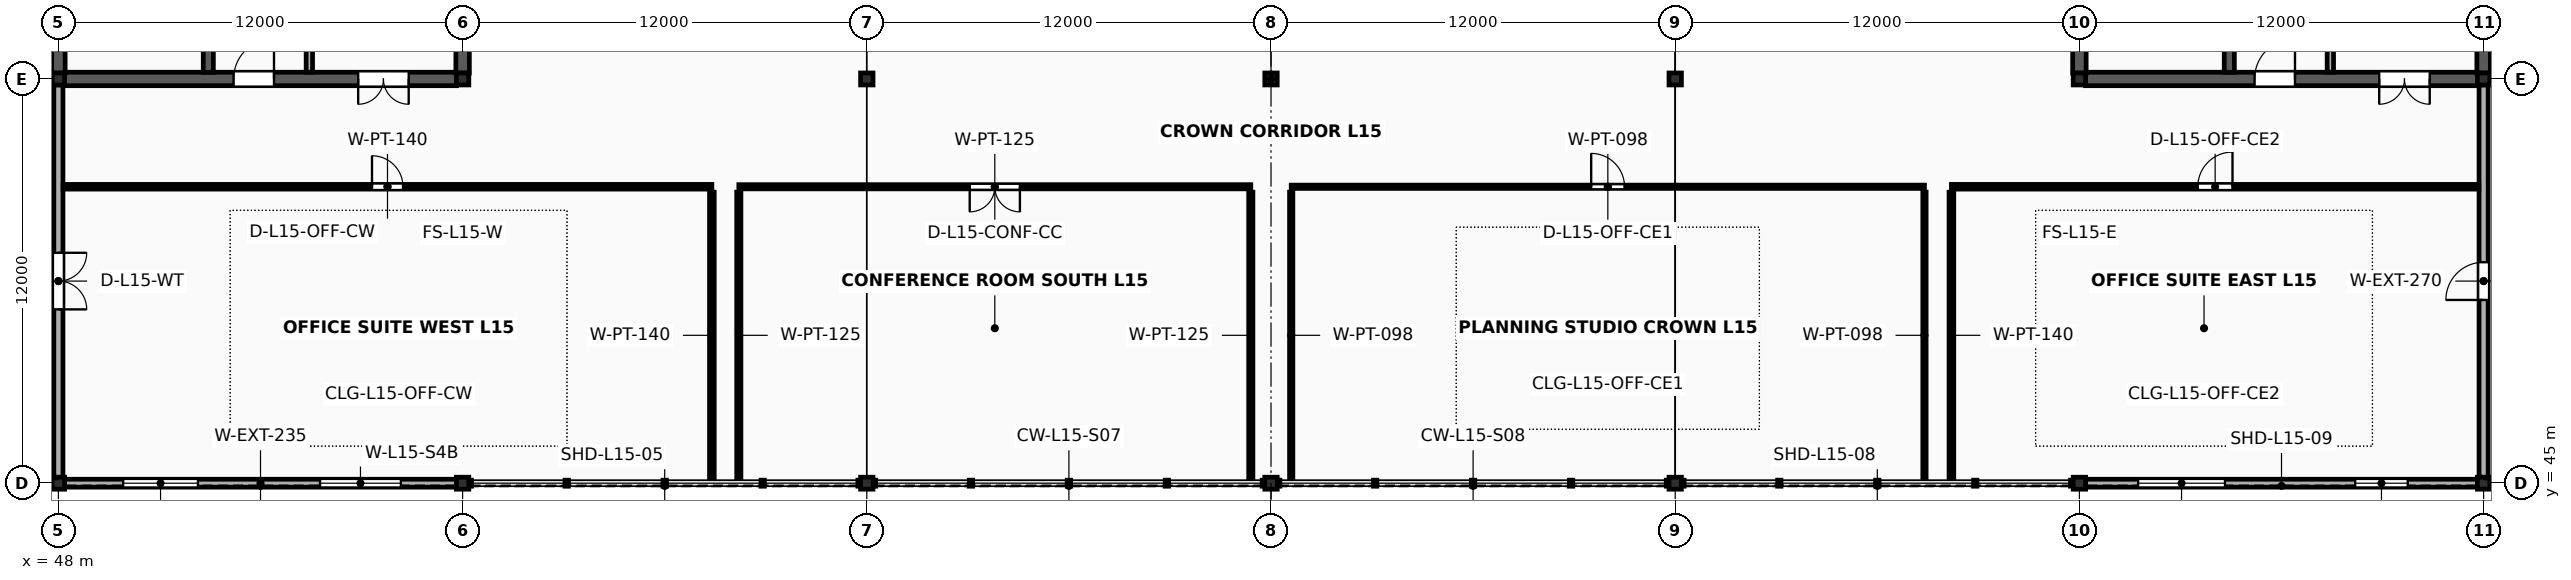
"""IFC4 building model, lengths in metres.
Left out: names, types, materials, properties, quantities, classifications, styles, units other than length and angle.
Written with IfcOpenShell. Run it as: python <this file> out.ifc"""

import sys

from ifc_helpers import new_model, si_unit, direction, frame, frame_2d, origin, origin_2d, place, context, subcontext, project, spatial, rectangle, i_section, extrude, element, fill, save


model = new_model("IFC4")
c1 = context("Model", 3, precision=1e-05, world=origin(), true_north=direction((0.0, 1.0)))
c2 = subcontext(c1, "Body", "Model", "MODEL_VIEW")
j1 = project(units=[si_unit("LENGTHUNIT", "METRE"), si_unit("PLANEANGLEUNIT", "RADIAN")], contexts=[c1])
p1 = place(None, origin())
s1 = spatial("IfcSite", under=j1, at=p1, CompositionType="ELEMENT")
p2 = place(p1, origin())
s2 = spatial("IfcBuilding", under=s1, at=p2, CompositionType="ELEMENT")
p3 = place(p2, frame((0.0, 0.0, 61.6)))
s3 = spatial("IfcBuildingStorey", under=s2, at=p3, CompositionType="ELEMENT", Elevation=61.6)
for number, where, z_axis, x_axis in (
    (1, (48.0, 45.0, 0.0), (0.0, 0.0, 1.0), (1.0, 0.0, 0.0)),
    (2, (48.0, 57.0, 0.0), (0.0, 0.0, 1.0), (1.0, 0.0, 0.0)),
    (3, (60.0, 45.0, 0.0), (0.0, 0.0, 1.0), (1.0, 0.0, 0.0)),
    (4, (60.0, 57.0, 0.0), (0.0, 0.0, 1.0), (1.0, 0.0, 0.0)),
    (5, (72.0, 45.0, 0.0), (0.0, 0.0, 1.0), (1.0, 0.0, 0.0)),
    (6, (72.0, 57.0, 0.0), (0.0, 0.0, 1.0), (1.0, 0.0, 0.0)),
    (7, (84.0, 45.0, 0.0), (0.0, 0.0, 1.0), (1.0, 0.0, 0.0)),
    (8, (84.0, 57.0, 0.0), (0.0, 0.0, 1.0), (1.0, 0.0, 0.0)),
    (9, (96.0, 45.0, 0.0), (0.0, 0.0, 1.0), (1.0, 0.0, 0.0)),
    (10, (96.0, 57.0, 0.0), (0.0, 0.0, 1.0), (1.0, 0.0, 0.0)),
    (11, (108.0, 45.0, 0.0), (0.0, 0.0, 1.0), (1.0, 0.0, 0.0)),
    (12, (108.0, 57.0, 0.0), (0.0, 0.0, 1.0), (1.0, 0.0, 0.0)),
    (13, (120.0, 45.0, 0.0), (0.0, 0.0, 1.0), (1.0, 0.0, 0.0)),
    (14, (120.0, 57.0, 0.0), (0.0, 0.0, 1.0), (1.0, 0.0, 0.0)),
):
    element("IfcColumn", number, at=place(p3, frame(where, z_axis=z_axis, x_axis=x_axis)), inside=s3, PredefinedType="COLUMN", context=c2, shape_type="SweptSolid", body=[
        extrude(i_section(OverallWidth=0.369, OverallDepth=0.356, WebThickness=0.011, FlangeThickness=0.018, FilletRadius=0.018, at=origin_2d()), origin(), (0.0, 0.0, 1.0), 4.0),
    ])
p4 = place(p3, frame((48.181, 57.0, 0.0), z_axis=(0.0, 0.0, 1.0), x_axis=(1.0, 0.0, 0.0)))
e15 = element("IfcWall", 15, at=p4, inside=s3, PredefinedType="SHEAR", context=c2, shape_type="SweptSolid", body=[
    extrude(rectangle(XDim=11.637, YDim=0.4, at=frame_2d((5.819, 0.0))), origin(), (0.0, 0.0, 1.0), 3.843),
])
p5 = place(p4, frame((5.019, 0.0, 0.0)))
e16 = element("IfcOpeningElement", 16, at=p5, cuts=e15, PredefinedType="OPENING", context=c2, shape_type="SweptSolid", body=[
    extrude(rectangle(XDim=1.2, YDim=2.2, at=frame_2d((0.6, 1.1))), frame((0.0, 0.215, 0.0), z_axis=(0.0, -1.0, 0.0), x_axis=(1.0, 0.0, 0.0)), (0.0, 0.0, 1.0), 0.43),
])
p6 = place(p4, frame((8.718, 0.0, 0.0)))
e17 = element("IfcOpeningElement", 17, at=p6, cuts=e15, PredefinedType="OPENING", context=c2, shape_type="SweptSolid", body=[
    extrude(rectangle(XDim=1.5, YDim=2.25, at=frame_2d((0.75, 1.125))), frame((0.0, 0.215, 0.0), z_axis=(0.0, -1.0, 0.0), x_axis=(1.0, 0.0, 0.0)), (0.0, 0.0, 1.0), 0.43),
])
for number, where, z_axis, x_axis in (
    (18, (48.0, 57.175, 0.0), (0.0, 0.0, 1.0), (0.0, 1.0, 0.0)),
    (19, (60.0, 57.175, 0.0), (0.0, 0.0, 1.0), (0.0, 1.0, 0.0)),
):
    element("IfcWall", number, at=place(p3, frame(where, z_axis=z_axis, x_axis=x_axis)), inside=s3, PredefinedType="SHEAR", context=c2, shape_type="SweptSolid", body=[
        extrude(rectangle(XDim=11.65, YDim=0.4, at=frame_2d((5.825, 0.0))), origin(), (0.0, 0.0, 1.0), 3.843),
    ])
p7 = place(p3, frame((52.45, 57.197, 0.0), z_axis=(0.0, 0.0, 1.0), x_axis=(0.0, 1.0, 0.0)))
e20 = element("IfcWall", 20, at=p7, inside=s3, PredefinedType="SHEAR", context=c2, shape_type="SweptSolid", body=[
    extrude(rectangle(XDim=11.606, YDim=0.3, at=frame_2d((5.803, 0.0))), origin(), (0.0, 0.0, 1.0), 3.843),
])
p8 = place(p7, frame((0.9, 0.0, 0.0)))
e21 = element("IfcOpeningElement", 21, at=p8, cuts=e20, PredefinedType="OPENING", context=c2, shape_type="SweptSolid", body=[
    extrude(rectangle(XDim=1.1, YDim=2.2, at=frame_2d((0.55, 1.1))), frame((0.0, 0.165, 0.0), z_axis=(0.0, -1.0, 0.0), x_axis=(1.0, 0.0, 0.0)), (0.0, 0.0, 1.0), 0.33),
])
p9 = place(p3, frame((55.45, 57.2, 0.0), z_axis=(0.0, 0.0, 1.0), x_axis=(0.0, 1.0, 0.0)))
e22 = element("IfcWall", 22, at=p9, inside=s3, PredefinedType="SOLIDWALL", context=c2, shape_type="SweptSolid", body=[
    extrude(rectangle(XDim=8.48, YDim=0.19, at=frame_2d((4.24, 0.0))), origin(), (0.0, 0.0, 1.0), 3.833),
])
p10 = place(p9, frame((3.6, 0.0, 0.0)))
e23 = element("IfcOpeningElement", 23, at=p10, cuts=e22, PredefinedType="OPENING", context=c2, shape_type="SweptSolid", body=[
    extrude(rectangle(XDim=1.04, YDim=2.18, at=frame_2d((0.52, 1.09))), frame((0.0, 0.11, 0.0), z_axis=(0.0, -1.0, 0.0), x_axis=(1.0, 0.0, 0.0)), (0.0, 0.0, 1.0), 0.22),
])
p11 = place(p3, frame((108.181, 57.0, 0.0), z_axis=(0.0, 0.0, 1.0), x_axis=(1.0, 0.0, 0.0)))
e24 = element("IfcWall", 24, at=p11, inside=s3, PredefinedType="SHEAR", context=c2, shape_type="SweptSolid", body=[
    extrude(rectangle(XDim=11.637, YDim=0.4, at=frame_2d((5.819, 0.0))), origin(), (0.0, 0.0, 1.0), 3.843),
])
p12 = place(p11, frame((5.019, 0.0, 0.0)))
e25 = element("IfcOpeningElement", 25, at=p12, cuts=e24, PredefinedType="OPENING", context=c2, shape_type="SweptSolid", body=[
    extrude(rectangle(XDim=1.2, YDim=2.2, at=frame_2d((0.6, 1.1))), frame((0.0, 0.215, 0.0), z_axis=(0.0, -1.0, 0.0), x_axis=(1.0, 0.0, 0.0)), (0.0, 0.0, 1.0), 0.43),
])
p13 = place(p11, frame((8.719, 0.0, 0.0)))
e26 = element("IfcOpeningElement", 26, at=p13, cuts=e24, PredefinedType="OPENING", context=c2, shape_type="SweptSolid", body=[
    extrude(rectangle(XDim=1.5, YDim=2.25, at=frame_2d((0.75, 1.125))), frame((0.0, 0.215, 0.0), z_axis=(0.0, -1.0, 0.0), x_axis=(1.0, 0.0, 0.0)), (0.0, 0.0, 1.0), 0.43),
])
for number, where, z_axis, x_axis in (
    (27, (108.0, 57.175, 0.0), (0.0, 0.0, 1.0), (0.0, 1.0, 0.0)),
    (28, (120.0, 57.175, 0.0), (0.0, 0.0, 1.0), (0.0, 1.0, 0.0)),
):
    element("IfcWall", number, at=place(p3, frame(where, z_axis=z_axis, x_axis=x_axis)), inside=s3, PredefinedType="SHEAR", context=c2, shape_type="SweptSolid", body=[
        extrude(rectangle(XDim=11.65, YDim=0.4, at=frame_2d((5.825, 0.0))), origin(), (0.0, 0.0, 1.0), 3.843),
    ])
p14 = place(p3, frame((112.45, 57.197, 0.0), z_axis=(0.0, 0.0, 1.0), x_axis=(0.0, 1.0, 0.0)))
e29 = element("IfcWall", 29, at=p14, inside=s3, PredefinedType="SHEAR", context=c2, shape_type="SweptSolid", body=[
    extrude(rectangle(XDim=11.606, YDim=0.3, at=frame_2d((5.803, 0.0))), origin(), (0.0, 0.0, 1.0), 3.843),
])
p15 = place(p14, frame((0.9, 0.0, 0.0)))
e30 = element("IfcOpeningElement", 30, at=p15, cuts=e29, PredefinedType="OPENING", context=c2, shape_type="SweptSolid", body=[
    extrude(rectangle(XDim=1.1, YDim=2.2, at=frame_2d((0.55, 1.1))), frame((0.0, 0.165, 0.0), z_axis=(0.0, -1.0, 0.0), x_axis=(1.0, 0.0, 0.0)), (0.0, 0.0, 1.0), 0.33),
])
p16 = place(p3, frame((115.45, 57.2, 0.0), z_axis=(0.0, 0.0, 1.0), x_axis=(0.0, 1.0, 0.0)))
e31 = element("IfcWall", 31, at=p16, inside=s3, PredefinedType="SOLIDWALL", context=c2, shape_type="SweptSolid", body=[
    extrude(rectangle(XDim=8.48, YDim=0.19, at=frame_2d((4.24, 0.0))), origin(), (0.0, 0.0, 1.0), 3.833),
])
p17 = place(p16, frame((3.6, 0.0, 0.0)))
e32 = element("IfcOpeningElement", 32, at=p17, cuts=e31, PredefinedType="OPENING", context=c2, shape_type="SweptSolid", body=[
    extrude(rectangle(XDim=1.04, YDim=2.18, at=frame_2d((0.52, 1.09))), frame((0.0, 0.11, 0.0), z_axis=(0.0, -1.0, 0.0), x_axis=(1.0, 0.0, 0.0)), (0.0, 0.0, 1.0), 0.22),
])
p18 = place(p3, frame((48.183, 45.0, 0.0), z_axis=(0.0, 0.0, 1.0), x_axis=(1.0, 0.0, 0.0)))
e33 = element("IfcWall", 33, at=p18, inside=s3, PredefinedType="SOLIDWALL", context=c2, shape_type="SweptSolid", body=[
    extrude(rectangle(XDim=11.635, YDim=0.235, at=frame_2d((5.817, 0.0))), origin(), (0.0, 0.0, 1.0), 3.296),
])
p19 = place(p18, frame((1.74, 0.0, 0.78)))
e34 = element("IfcOpeningElement", 34, at=p19, cuts=e33, PredefinedType="OPENING", context=c2, shape_type="SweptSolid", body=[
    extrude(rectangle(XDim=2.22, YDim=1.74, at=frame_2d((1.11, 0.87))), frame((0.0, 0.133, 0.0), z_axis=(0.0, -1.0, 0.0), x_axis=(1.0, 0.0, 0.0)), (0.0, 0.0, 1.0), 0.265),
])
p20 = place(p18, frame((7.585, 0.0, 0.78)))
e35 = element("IfcOpeningElement", 35, at=p20, cuts=e33, PredefinedType="OPENING", context=c2, shape_type="SweptSolid", body=[
    extrude(rectangle(XDim=2.4, YDim=1.74, at=frame_2d((1.2, 0.87))), frame((0.0, 0.133, 0.0), z_axis=(0.0, -1.0, 0.0), x_axis=(1.0, 0.0, 0.0)), (0.0, 0.0, 1.0), 0.265),
])
p21 = place(p3, frame((108.183, 45.0, 0.0), z_axis=(0.0, 0.0, 1.0), x_axis=(1.0, 0.0, 0.0)))
e36 = element("IfcWall", 36, at=p21, inside=s3, PredefinedType="SOLIDWALL", context=c2, shape_type="SweptSolid", body=[
    extrude(rectangle(XDim=11.635, YDim=0.235, at=frame_2d((5.817, 0.0))), origin(), (0.0, 0.0, 1.0), 3.296),
])
p22 = place(p21, frame((1.56, 0.0, 0.78)))
e37 = element("IfcOpeningElement", 37, at=p22, cuts=e36, PredefinedType="OPENING", context=c2, shape_type="SweptSolid", body=[
    extrude(rectangle(XDim=2.58, YDim=1.74, at=frame_2d((1.29, 0.87))), frame((0.0, 0.133, 0.0), z_axis=(0.0, -1.0, 0.0), x_axis=(1.0, 0.0, 0.0)), (0.0, 0.0, 1.0), 0.265),
])
p23 = place(p21, frame((8.005, 0.0, 0.78)))
e38 = element("IfcOpeningElement", 38, at=p23, cuts=e36, PredefinedType="OPENING", context=c2, shape_type="SweptSolid", body=[
    extrude(rectangle(XDim=1.56, YDim=1.9, at=frame_2d((0.78, 0.95))), frame((0.0, 0.133, 0.0), z_axis=(0.0, -1.0, 0.0), x_axis=(1.0, 0.0, 0.0)), (0.0, 0.0, 1.0), 0.265),
])
p24 = place(p3, frame((48.0, 45.176, 0.0), z_axis=(0.0, 0.0, 1.0), x_axis=(0.0, 1.0, 0.0)))
e39 = element("IfcWall", 39, at=p24, inside=s3, PredefinedType="SOLIDWALL", context=c2, shape_type="SweptSolid", body=[
    extrude(rectangle(XDim=11.648, YDim=0.27, at=frame_2d((5.824, 0.0))), origin(), (0.0, 0.0, 1.0), 3.296),
])
p25 = place(p24, frame((4.984, 0.0, 0.0)))
e40 = element("IfcOpeningElement", 40, at=p25, cuts=e39, PredefinedType="OPENING", context=c2, shape_type="SweptSolid", body=[
    extrude(rectangle(XDim=1.68, YDim=2.34, at=frame_2d((0.84, 1.17))), frame((0.0, 0.15, 0.0), z_axis=(0.0, -1.0, 0.0), x_axis=(1.0, 0.0, 0.0)), (0.0, 0.0, 1.0), 0.3),
])
p26 = place(p3, frame((120.0, 45.176, 0.0), z_axis=(0.0, 0.0, 1.0), x_axis=(0.0, 1.0, 0.0)))
e41 = element("IfcWall", 41, at=p26, inside=s3, PredefinedType="SOLIDWALL", context=c2, shape_type="SweptSolid", body=[
    extrude(rectangle(XDim=11.648, YDim=0.27, at=frame_2d((5.824, 0.0))), origin(), (0.0, 0.0, 1.0), 3.296),
])
p27 = place(p26, frame((5.264, 0.0, 0.0)))
e42 = element("IfcOpeningElement", 42, at=p27, cuts=e41, PredefinedType="OPENING", context=c2, shape_type="SweptSolid", body=[
    extrude(rectangle(XDim=1.12, YDim=2.18, at=frame_2d((0.56, 1.09))), frame((0.0, 0.15, 0.0), z_axis=(0.0, -1.0, 0.0), x_axis=(1.0, 0.0, 0.0)), (0.0, 0.0, 1.0), 0.3),
])
p28 = place(p3, frame((48.14, 53.8, 0.0), z_axis=(0.0, 0.0, 1.0), x_axis=(1.0, 0.0, 0.0)))
e43 = element("IfcWall", 43, at=p28, inside=s3, PredefinedType="PARTITIONING", context=c2, shape_type="SweptSolid", body=[
    extrude(rectangle(XDim=19.26, YDim=0.14, at=frame_2d((9.63, 0.0))), origin(), (0.0, 0.0, 1.0), 2.88),
])
p29 = place(p28, frame((9.17, 0.0, 0.0)))
e44 = element("IfcOpeningElement", 44, at=p29, cuts=e43, PredefinedType="OPENING", context=c2, shape_type="SweptSolid", body=[
    extrude(rectangle(XDim=0.92, YDim=2.1, at=frame_2d((0.46, 1.05))), frame((0.0, 0.085, 0.0), z_axis=(0.0, -1.0, 0.0), x_axis=(1.0, 0.0, 0.0)), (0.0, 0.0, 1.0), 0.17),
])
p30 = place(p3, frame((67.4, 45.14, 0.0), z_axis=(0.0, 0.0, 1.0), x_axis=(0.0, 1.0, 0.0)))
e45 = element("IfcWall", 45, at=p30, inside=s3, PredefinedType="PARTITIONING", context=c2, shape_type="SweptSolid", body=[
    extrude(rectangle(XDim=8.5, YDim=0.14, at=frame_2d((4.25, 0.0))), origin(), (0.0, 0.0, 1.0), 2.88),
])
p31 = place(p3, frame((68.2, 53.8, 0.0), z_axis=(0.0, 0.0, 1.0), x_axis=(1.0, 0.0, 0.0)))
e46 = element("IfcWall", 46, at=p31, inside=s3, PredefinedType="PARTITIONING", context=c2, shape_type="SweptSolid", body=[
    extrude(rectangle(XDim=15.2, YDim=0.125, at=frame_2d((7.6, 0.0))), origin(), (0.0, 0.0, 1.0), 2.88),
])
p32 = place(p31, frame((6.855, 0.0, 0.0)))
e47 = element("IfcOpeningElement", 47, at=p32, cuts=e46, PredefinedType="OPENING", context=c2, shape_type="SweptSolid", body=[
    extrude(rectangle(XDim=1.49, YDim=2.28, at=frame_2d((0.745, 1.14))), frame((0.0, 0.077, 0.0), z_axis=(0.0, -1.0, 0.0), x_axis=(1.0, 0.0, 0.0)), (0.0, 0.0, 1.0), 0.155),
])
for number, where, z_axis, x_axis in (
    (48, (68.2, 45.14, 0.0), (0.0, 0.0, 1.0), (0.0, 1.0, 0.0)),
    (49, (83.4, 45.14, 0.0), (0.0, 0.0, 1.0), (0.0, 1.0, 0.0)),
):
    element("IfcWall", number, at=place(p3, frame(where, z_axis=z_axis, x_axis=x_axis)), inside=s3, PredefinedType="PARTITIONING", context=c2, shape_type="SweptSolid", body=[
        extrude(rectangle(XDim=8.5, YDim=0.125, at=frame_2d((4.25, 0.0))), origin(), (0.0, 0.0, 1.0), 2.88),
    ])
p33 = place(p3, frame((84.6, 53.8, 0.0), z_axis=(0.0, 0.0, 1.0), x_axis=(1.0, 0.0, 0.0)))
e50 = element("IfcWall", 50, at=p33, inside=s3, PredefinedType="PARTITIONING", context=c2, shape_type="SweptSolid", body=[
    extrude(rectangle(XDim=18.8, YDim=0.098, at=frame_2d((9.4, 0.0))), origin(), (0.0, 0.0, 1.0), 2.88),
])
p34 = place(p33, frame((8.905, 0.0, 0.0)))
e51 = element("IfcOpeningElement", 51, at=p34, cuts=e50, PredefinedType="OPENING", context=c2, shape_type="SweptSolid", body=[
    extrude(rectangle(XDim=0.99, YDim=2.15, at=frame_2d((0.495, 1.075))), frame((0.0, 0.064, 0.0), z_axis=(0.0, -1.0, 0.0), x_axis=(1.0, 0.0, 0.0)), (0.0, 0.0, 1.0), 0.128),
])
for number, where, z_axis, x_axis in (
    (52, (84.6, 45.14, 0.0), (0.0, 0.0, 1.0), (0.0, 1.0, 0.0)),
    (53, (103.4, 45.14, 0.0), (0.0, 0.0, 1.0), (0.0, 1.0, 0.0)),
):
    element("IfcWall", number, at=place(p3, frame(where, z_axis=z_axis, x_axis=x_axis)), inside=s3, PredefinedType="PARTITIONING", context=c2, shape_type="SweptSolid", body=[
        extrude(rectangle(XDim=8.5, YDim=0.098, at=frame_2d((4.25, 0.0))), origin(), (0.0, 0.0, 1.0), 2.88),
    ])
p35 = place(p3, frame((104.2, 53.8, 0.0), z_axis=(0.0, 0.0, 1.0), x_axis=(1.0, 0.0, 0.0)))
e54 = element("IfcWall", 54, at=p35, inside=s3, PredefinedType="PARTITIONING", context=c2, shape_type="SweptSolid", body=[
    extrude(rectangle(XDim=15.66, YDim=0.14, at=frame_2d((7.83, 0.0))), origin(), (0.0, 0.0, 1.0), 2.88),
])
p36 = place(p35, frame((7.315, 0.0, 0.0)))
e55 = element("IfcOpeningElement", 55, at=p36, cuts=e54, PredefinedType="OPENING", context=c2, shape_type="SweptSolid", body=[
    extrude(rectangle(XDim=1.03, YDim=2.17, at=frame_2d((0.515, 1.085))), frame((0.0, 0.085, 0.0), z_axis=(0.0, -1.0, 0.0), x_axis=(1.0, 0.0, 0.0)), (0.0, 0.0, 1.0), 0.17),
])
p37 = place(p3, frame((104.2, 45.14, 0.0), z_axis=(0.0, 0.0, 1.0), x_axis=(0.0, 1.0, 0.0)))
e56 = element("IfcWall", 56, at=p37, inside=s3, PredefinedType="PARTITIONING", context=c2, shape_type="SweptSolid", body=[
    extrude(rectangle(XDim=8.5, YDim=0.14, at=frame_2d((4.25, 0.0))), origin(), (0.0, 0.0, 1.0), 2.88),
])
p38 = place(p19, origin())
e57 = element("IfcWindow", 57, at=p38, inside=s3, PartitioningType="DOUBLE_PANEL_VERTICAL", PredefinedType="WINDOW", context=c2, shape_type="SweptSolid", body=[
    extrude(rectangle(XDim=2.22, YDim=1.74, at=frame_2d((1.11, 0.87))), frame((0.0, 0.03, 0.0), z_axis=(0.0, -1.0, 0.0), x_axis=(1.0, 0.0, 0.0)), (0.0, 0.0, 1.0), 0.06),
])
fill(e34, e57)
p39 = place(p20, origin())
e58 = element("IfcWindow", 58, at=p39, inside=s3, PartitioningType="DOUBLE_PANEL_VERTICAL", PredefinedType="WINDOW", context=c2, shape_type="SweptSolid", body=[
    extrude(rectangle(XDim=2.4, YDim=1.74, at=frame_2d((1.2, 0.87))), frame((0.0, 0.03, 0.0), z_axis=(0.0, -1.0, 0.0), x_axis=(1.0, 0.0, 0.0)), (0.0, 0.0, 1.0), 0.06),
])
fill(e35, e58)
p40 = place(p22, origin())
e59 = element("IfcWindow", 59, at=p40, inside=s3, PartitioningType="DOUBLE_PANEL_VERTICAL", PredefinedType="WINDOW", context=c2, shape_type="SweptSolid", body=[
    extrude(rectangle(XDim=2.58, YDim=1.74, at=frame_2d((1.29, 0.87))), frame((0.0, 0.03, 0.0), z_axis=(0.0, -1.0, 0.0), x_axis=(1.0, 0.0, 0.0)), (0.0, 0.0, 1.0), 0.06),
])
fill(e37, e59)
p41 = place(p23, origin())
e60 = element("IfcWindow", 60, at=p41, inside=s3, PartitioningType="SINGLE_PANEL", PredefinedType="WINDOW", context=c2, shape_type="SweptSolid", body=[
    extrude(rectangle(XDim=1.56, YDim=1.9, at=frame_2d((0.78, 0.95))), frame((0.0, 0.03, 0.0), z_axis=(0.0, -1.0, 0.0), x_axis=(1.0, 0.0, 0.0)), (0.0, 0.0, 1.0), 0.06),
])
fill(e38, e60)
p42 = place(p25, origin())
e61 = element("IfcDoor", 61, at=p42, inside=s3, OperationType="DOUBLE_DOOR_SINGLE_SWING", PredefinedType="DOOR", context=c2, shape_type="SweptSolid", body=[
    extrude(rectangle(XDim=1.68, YDim=2.34, at=frame_2d((0.84, 1.17))), frame((0.0, 0.025, 0.0), z_axis=(0.0, -1.0, 0.0), x_axis=(1.0, 0.0, 0.0)), (0.0, 0.0, 1.0), 0.05),
])
fill(e40, e61)
p43 = place(p27, origin())
e62 = element("IfcDoor", 62, at=p43, inside=s3, OperationType="SINGLE_SWING_LEFT", PredefinedType="DOOR", context=c2, shape_type="SweptSolid", body=[
    extrude(rectangle(XDim=1.12, YDim=2.18, at=frame_2d((0.56, 1.09))), frame((0.0, 0.025, 0.0), z_axis=(0.0, -1.0, 0.0), x_axis=(1.0, 0.0, 0.0)), (0.0, 0.0, 1.0), 0.05),
])
fill(e42, e62)
p44 = place(p5, origin())
e63 = element("IfcDoor", 63, at=p44, inside=s3, OperationType="SINGLE_SWING_RIGHT", PredefinedType="DOOR", context=c2, shape_type="SweptSolid", body=[
    extrude(rectangle(XDim=1.2, YDim=2.2, at=frame_2d((0.6, 1.1))), frame((0.0, 0.025, 0.0), z_axis=(0.0, -1.0, 0.0), x_axis=(1.0, 0.0, 0.0)), (0.0, 0.0, 1.0), 0.05),
])
fill(e16, e63)
p45 = place(p6, origin())
e64 = element("IfcDoor", 64, at=p45, inside=s3, OperationType="DOUBLE_DOOR_SINGLE_SWING", PredefinedType="DOOR", context=c2, shape_type="SweptSolid", body=[
    extrude(rectangle(XDim=1.5, YDim=2.25, at=frame_2d((0.75, 1.125))), frame((0.0, 0.025, 0.0), z_axis=(0.0, -1.0, 0.0), x_axis=(1.0, 0.0, 0.0)), (0.0, 0.0, 1.0), 0.05),
])
fill(e17, e64)
p46 = place(p12, origin())
e65 = element("IfcDoor", 65, at=p46, inside=s3, OperationType="SINGLE_SWING_RIGHT", PredefinedType="DOOR", context=c2, shape_type="SweptSolid", body=[
    extrude(rectangle(XDim=1.2, YDim=2.2, at=frame_2d((0.6, 1.1))), frame((0.0, 0.025, 0.0), z_axis=(0.0, -1.0, 0.0), x_axis=(1.0, 0.0, 0.0)), (0.0, 0.0, 1.0), 0.05),
])
fill(e25, e65)
p47 = place(p13, origin())
e66 = element("IfcDoor", 66, at=p47, inside=s3, OperationType="DOUBLE_DOOR_SINGLE_SWING", PredefinedType="DOOR", context=c2, shape_type="SweptSolid", body=[
    extrude(rectangle(XDim=1.5, YDim=2.25, at=frame_2d((0.75, 1.125))), frame((0.0, 0.025, 0.0), z_axis=(0.0, -1.0, 0.0), x_axis=(1.0, 0.0, 0.0)), (0.0, 0.0, 1.0), 0.05),
])
fill(e26, e66)
p48 = place(p29, origin())
e67 = element("IfcDoor", 67, at=p48, inside=s3, OperationType="SINGLE_SWING_LEFT", PredefinedType="DOOR", context=c2, shape_type="SweptSolid", body=[
    extrude(rectangle(XDim=0.92, YDim=2.1, at=frame_2d((0.46, 1.05))), frame((0.0, 0.025, 0.0), z_axis=(0.0, -1.0, 0.0), x_axis=(1.0, 0.0, 0.0)), (0.0, 0.0, 1.0), 0.05),
])
fill(e44, e67)
p49 = place(p32, origin())
e68 = element("IfcDoor", 68, at=p49, inside=s3, OperationType="DOUBLE_DOOR_SINGLE_SWING", PredefinedType="DOOR", context=c2, shape_type="SweptSolid", body=[
    extrude(rectangle(XDim=1.49, YDim=2.28, at=frame_2d((0.745, 1.14))), frame((0.0, 0.025, 0.0), z_axis=(0.0, -1.0, 0.0), x_axis=(1.0, 0.0, 0.0)), (0.0, 0.0, 1.0), 0.05),
])
fill(e47, e68)
p50 = place(p34, origin())
e69 = element("IfcDoor", 69, at=p50, inside=s3, OperationType="SINGLE_SWING_LEFT", PredefinedType="DOOR", context=c2, shape_type="SweptSolid", body=[
    extrude(rectangle(XDim=0.99, YDim=2.15, at=frame_2d((0.495, 1.075))), frame((0.0, 0.025, 0.0), z_axis=(0.0, -1.0, 0.0), x_axis=(1.0, 0.0, 0.0)), (0.0, 0.0, 1.0), 0.05),
])
fill(e51, e69)
p51 = place(p36, origin())
e70 = element("IfcDoor", 70, at=p51, inside=s3, OperationType="SINGLE_SWING_RIGHT", PredefinedType="DOOR", context=c2, shape_type="SweptSolid", body=[
    extrude(rectangle(XDim=1.03, YDim=2.17, at=frame_2d((0.515, 1.085))), frame((0.0, 0.025, 0.0), z_axis=(0.0, -1.0, 0.0), x_axis=(1.0, 0.0, 0.0)), (0.0, 0.0, 1.0), 0.05),
])
fill(e55, e70)
save(model, sys.argv[1])
